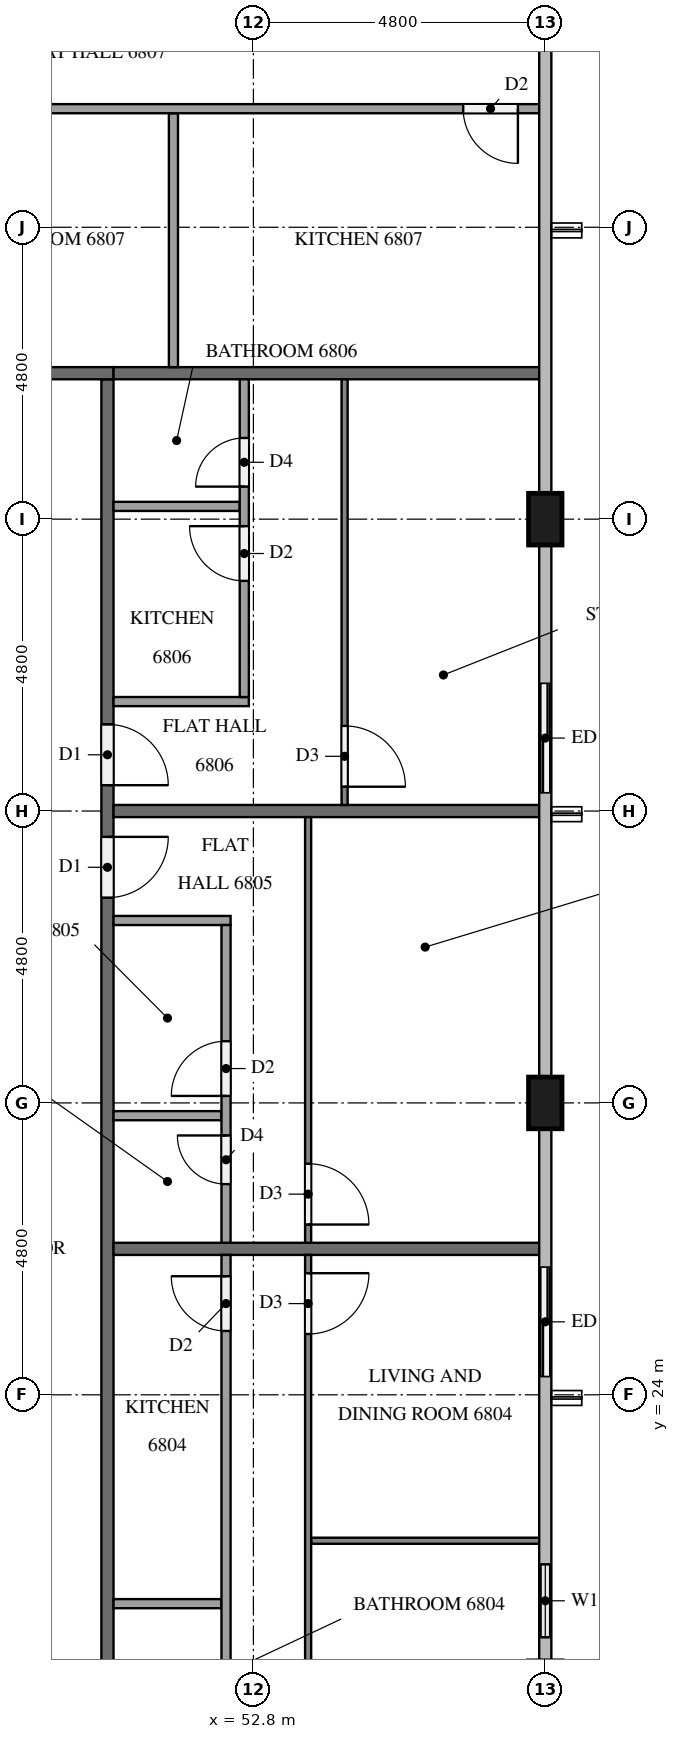
"""IFC4 building model, lengths in metres.
Left out: names, types, materials, properties, quantities, classifications, styles, units other than length and angle.
Written with IfcOpenShell. Run it as: python <this file> out.ifc"""

import sys

from ifc_helpers import new_model, si_unit, direction, frame, frame_2d, origin, origin_2d, place, context, subcontext, project, spatial, rectangle, extrude, element, fill, save


model = new_model("IFC4")
c1 = context("Model", 3, precision=1e-05, world=origin(), true_north=direction((0.0, 1.0)))
c2 = subcontext(c1, "Body", "Model", "MODEL_VIEW")
j1 = project(units=[si_unit("LENGTHUNIT", "METRE"), si_unit("PLANEANGLEUNIT", "RADIAN")], contexts=[c1])
p1 = place(None, origin())
s1 = spatial("IfcSite", under=j1, at=p1, CompositionType="ELEMENT")
p2 = place(p1, origin())
s2 = spatial("IfcBuilding", under=s1, at=p2, CompositionType="ELEMENT")
p3 = place(p2, frame((0.0, 0.0, 259.7)))
s3 = spatial("IfcBuildingStorey", under=s2, at=p3, CompositionType="ELEMENT", Elevation=259.7)
for number, where, z_axis, x_axis in (
    (1, (57.6, 28.8, 0.0), (0.0, 0.0, 1.0), (0.0, 1.0, 0.0)),
    (2, (57.6, 38.4, 0.0), (0.0, 0.0, 1.0), (0.0, 1.0, 0.0)),
):
    element("IfcColumn", number, at=place(p3, frame(where, z_axis=z_axis, x_axis=x_axis)), inside=s3, PredefinedType="COLUMN", context=c2, shape_type="SweptSolid", body=[
        extrude(rectangle(XDim=0.85, YDim=0.55, at=origin_2d()), origin(), (0.0, 0.0, 1.0), 3.1),
    ])
p4 = place(p3, frame((57.6, 19.625, 0.0), z_axis=(0.0, 0.0, 1.0), x_axis=(0.0, 1.0, 0.0)))
e3 = element("IfcWall", 3, at=p4, inside=s3, PredefinedType="SOLIDWALL", context=c2, shape_type="SweptSolid", body=[
    extrude(rectangle(XDim=1.975, YDim=0.15, at=frame_2d((0.988, 0.0))), origin(), (0.0, 0.0, 1.0), 3.1),
])
p5 = place(p4, frame((0.387, 0.0, 0.9)))
e4 = element("IfcOpeningElement", 4, at=p5, cuts=e3, PredefinedType="OPENING", context=c2, shape_type="SweptSolid", body=[
    extrude(rectangle(XDim=1.2, YDim=1.4, at=frame_2d((0.6, 0.7))), frame((0.0, 0.085, 0.0), z_axis=(0.0, -1.0, 0.0), x_axis=(1.0, 0.0, 0.0)), (0.0, 0.0, 1.0), 0.17),
])
p6 = place(p3, frame((57.6, 24.0, 0.0), z_axis=(0.0, 0.0, 1.0), x_axis=(0.0, 1.0, 0.0)))
e5 = element("IfcWall", 5, at=p6, inside=s3, PredefinedType="SOLIDWALL", context=c2, shape_type="SweptSolid", body=[
    extrude(rectangle(XDim=2.4, YDim=0.15, at=frame_2d((1.2, 0.0))), origin(), (0.0, 0.0, 1.0), 3.1),
])
p7 = place(p6, frame((0.3, 0.0, 0.0)))
e6 = element("IfcOpeningElement", 6, at=p7, cuts=e5, PredefinedType="OPENING", context=c2, shape_type="SweptSolid", body=[
    extrude(rectangle(XDim=1.8, YDim=2.4, at=frame_2d((0.9, 1.2))), frame((0.0, 0.085, 0.0), z_axis=(0.0, -1.0, 0.0), x_axis=(1.0, 0.0, 0.0)), (0.0, 0.0, 1.0), 0.17),
])
p8 = place(p3, frame((57.6, 33.6, 0.0), z_axis=(0.0, 0.0, 1.0), x_axis=(0.0, 1.0, 0.0)))
e7 = element("IfcWall", 7, at=p8, inside=s3, PredefinedType="SOLIDWALL", context=c2, shape_type="SweptSolid", body=[
    extrude(rectangle(XDim=2.4, YDim=0.15, at=frame_2d((1.2, 0.0))), origin(), (0.0, 0.0, 1.0), 3.1),
])
p9 = place(p8, frame((0.3, 0.0, 0.0)))
e8 = element("IfcOpeningElement", 8, at=p9, cuts=e7, PredefinedType="OPENING", context=c2, shape_type="SweptSolid", body=[
    extrude(rectangle(XDim=1.8, YDim=2.4, at=frame_2d((0.9, 1.2))), frame((0.0, 0.085, 0.0), z_axis=(0.0, -1.0, 0.0), x_axis=(1.0, 0.0, 0.0)), (0.0, 0.0, 1.0), 0.17),
])
p10 = place(p3, frame((50.4, 40.7, 0.0), z_axis=(0.0, 0.0, 1.0), x_axis=(0.0, -1.0, 0.0)))
e9 = element("IfcWall", 9, at=p10, inside=s3, PredefinedType="PARTITIONING", context=c2, shape_type="SweptSolid", body=[
    extrude(rectangle(XDim=28.6, YDim=0.2, at=frame_2d((14.3, 0.0))), origin(), (0.0, 0.0, 1.0), 3.1),
])
p11 = place(p10, frame((27.275, 0.0, 0.0)))
e10 = element("IfcOpeningElement", 10, at=p11, cuts=e9, PredefinedType="OPENING", context=c2, shape_type="SweptSolid", body=[
    extrude(rectangle(XDim=1.0, YDim=2.1, at=frame_2d((0.5, 1.05))), frame((0.0, 0.11, 0.0), z_axis=(0.0, -1.0, 0.0), x_axis=(1.0, 0.0, 0.0)), (0.0, 0.0, 1.0), 0.22),
])
p12 = place(p10, frame((7.525, 0.0, 0.0)))
e11 = element("IfcOpeningElement", 11, at=p12, cuts=e9, PredefinedType="OPENING", context=c2, shape_type="SweptSolid", body=[
    extrude(rectangle(XDim=1.0, YDim=2.1, at=frame_2d((0.5, 1.05))), frame((0.0, 0.11, 0.0), z_axis=(0.0, -1.0, 0.0), x_axis=(1.0, 0.0, 0.0)), (0.0, 0.0, 1.0), 0.22),
])
p13 = place(p10, frame((5.675, 0.0, 0.0)))
e12 = element("IfcOpeningElement", 12, at=p13, cuts=e9, PredefinedType="OPENING", context=c2, shape_type="SweptSolid", body=[
    extrude(rectangle(XDim=1.0, YDim=2.1, at=frame_2d((0.5, 1.05))), frame((0.0, 0.11, 0.0), z_axis=(0.0, -1.0, 0.0), x_axis=(1.0, 0.0, 0.0)), (0.0, 0.0, 1.0), 0.22),
])
p14 = place(p3, frame((11.9, 40.8, 0.0), z_axis=(0.0, 0.0, 1.0), x_axis=(1.0, 0.0, 0.0)))
e13 = element("IfcWall", 13, at=p14, inside=s3, PredefinedType="PARTITIONING", context=c2, shape_type="SweptSolid", body=[
    extrude(rectangle(XDim=38.6, YDim=0.2, at=frame_2d((19.3, 0.0))), origin(), (0.0, 0.0, 1.0), 3.1),
])
p15 = place(p14, frame((34.125, 0.0, 0.0)))
e14 = element("IfcOpeningElement", 14, at=p15, cuts=e13, PredefinedType="OPENING", context=c2, shape_type="SweptSolid", body=[
    extrude(rectangle(XDim=1.0, YDim=2.1, at=frame_2d((0.5, 1.05))), frame((0.0, 0.11, 0.0), z_axis=(0.0, -1.0, 0.0), x_axis=(1.0, 0.0, 0.0)), (0.0, 0.0, 1.0), 0.22),
])
p16 = place(p14, frame((24.525, 0.0, 0.0)))
e15 = element("IfcOpeningElement", 15, at=p16, cuts=e13, PredefinedType="OPENING", context=c2, shape_type="SweptSolid", body=[
    extrude(rectangle(XDim=1.0, YDim=2.1, at=frame_2d((0.5, 1.05))), frame((0.0, 0.11, 0.0), z_axis=(0.0, -1.0, 0.0), x_axis=(1.0, 0.0, 0.0)), (0.0, 0.0, 1.0), 0.22),
])
p17 = place(p14, frame((10.125, 0.0, 0.0)))
e16 = element("IfcOpeningElement", 16, at=p17, cuts=e13, PredefinedType="OPENING", context=c2, shape_type="SweptSolid", body=[
    extrude(rectangle(XDim=1.0, YDim=2.1, at=frame_2d((0.5, 1.05))), frame((0.0, 0.11, 0.0), z_axis=(0.0, -1.0, 0.0), x_axis=(1.0, 0.0, 0.0)), (0.0, 0.0, 1.0), 0.22),
])
p18 = place(p14, frame((8.275, 0.0, 0.0)))
e17 = element("IfcOpeningElement", 17, at=p18, cuts=e13, PredefinedType="OPENING", context=c2, shape_type="SweptSolid", body=[
    extrude(rectangle(XDim=1.0, YDim=2.1, at=frame_2d((0.5, 1.05))), frame((0.0, 0.11, 0.0), z_axis=(0.0, -1.0, 0.0), x_axis=(1.0, 0.0, 0.0)), (0.0, 0.0, 1.0), 0.22),
])
for number, where, z_axis, x_axis in (
    (18, (50.5, 26.4, 0.0), (0.0, 0.0, 1.0), (1.0, 0.0, 0.0)),
    (19, (50.5, 33.6, 0.0), (0.0, 0.0, 1.0), (1.0, 0.0, 0.0)),
    (20, (50.5, 40.8, 0.0), (0.0, 0.0, 1.0), (1.0, 0.0, 0.0)),
):
    element("IfcWall", number, at=place(p3, frame(where, z_axis=z_axis, x_axis=x_axis)), inside=s3, PredefinedType="PARTITIONING", context=c2, shape_type="SweptSolid", body=[
        extrude(rectangle(XDim=7.0, YDim=0.2, at=frame_2d((3.5, 0.0))), origin(), (0.0, 0.0, 1.0), 3.1),
    ])
p19 = place(p3, frame((53.75, 21.6, 0.0), z_axis=(0.0, 0.0, 1.0), x_axis=(1.0, 0.0, 0.0)))
e21 = element("IfcWall", 21, at=p19, inside=s3, PredefinedType="PARTITIONING", context=c2, shape_type="SweptSolid", body=[
    extrude(rectangle(XDim=3.75, YDim=0.1, at=frame_2d((1.875, 0.0))), origin(), (0.0, 0.0, 1.0), 3.1),
])
p20 = place(p3, frame((53.7, 26.3, 0.0), z_axis=(0.0, 0.0, 1.0), x_axis=(0.0, -1.0, 0.0)))
e22 = element("IfcWall", 22, at=p20, inside=s3, PredefinedType="PARTITIONING", context=c2, shape_type="SweptSolid", body=[
    extrude(rectangle(XDim=14.2, YDim=0.1, at=frame_2d((7.1, 0.0))), origin(), (0.0, 0.0, 1.0), 3.1),
])
p21 = place(p20, frame((9.85, 0.0, 0.0)))
e23 = element("IfcOpeningElement", 23, at=p21, cuts=e22, PredefinedType="OPENING", context=c2, shape_type="SweptSolid", body=[
    extrude(rectangle(XDim=0.9, YDim=2.1, at=frame_2d((0.45, 1.05))), frame((0.0, 0.06, 0.0), z_axis=(0.0, -1.0, 0.0), x_axis=(1.0, 0.0, 0.0)), (0.0, 0.0, 1.0), 0.12),
])
p22 = place(p20, frame((8.25, 0.0, 0.0)))
e24 = element("IfcOpeningElement", 24, at=p22, cuts=e22, PredefinedType="OPENING", context=c2, shape_type="SweptSolid", body=[
    extrude(rectangle(XDim=0.9, YDim=2.1, at=frame_2d((0.45, 1.05))), frame((0.0, 0.06, 0.0), z_axis=(0.0, -1.0, 0.0), x_axis=(1.0, 0.0, 0.0)), (0.0, 0.0, 1.0), 0.12),
])
p23 = place(p20, frame((0.3, 0.0, 0.0)))
e25 = element("IfcOpeningElement", 25, at=p23, cuts=e22, PredefinedType="OPENING", context=c2, shape_type="SweptSolid", body=[
    extrude(rectangle(XDim=1.0, YDim=2.1, at=frame_2d((0.5, 1.05))), frame((0.0, 0.06, 0.0), z_axis=(0.0, -1.0, 0.0), x_axis=(1.0, 0.0, 0.0)), (0.0, 0.0, 1.0), 0.12),
])
p24 = place(p3, frame((50.5, 20.565, 0.0), z_axis=(0.0, 0.0, 1.0), x_axis=(1.0, 0.0, 0.0)))
e26 = element("IfcWall", 26, at=p24, inside=s3, PredefinedType="PARTITIONING", context=c2, shape_type="SweptSolid", body=[
    extrude(rectangle(XDim=1.775, YDim=0.15, at=frame_2d((0.887, 0.0))), origin(), (0.0, 0.0, 1.0), 3.1),
])
p25 = place(p3, frame((52.35, 13.875, 0.0), z_axis=(0.0, 0.0, 1.0), x_axis=(0.0, 1.0, 0.0)))
e27 = element("IfcWall", 27, at=p25, inside=s3, PredefinedType="PARTITIONING", context=c2, shape_type="SweptSolid", body=[
    extrude(rectangle(XDim=12.425, YDim=0.15, at=frame_2d((6.212, 0.0))), origin(), (0.0, 0.0, 1.0), 3.1),
])
p26 = place(p25, frame((1.742, 0.0, 0.0)))
e28 = element("IfcOpeningElement", 28, at=p26, cuts=e27, PredefinedType="OPENING", context=c2, shape_type="SweptSolid", body=[
    extrude(rectangle(XDim=0.8, YDim=2.1, at=frame_2d((0.4, 1.05))), frame((0.0, 0.085, 0.0), z_axis=(0.0, -1.0, 0.0), x_axis=(1.0, 0.0, 0.0)), (0.0, 0.0, 1.0), 0.17),
])
p27 = place(p25, frame((3.192, 0.0, 0.0)))
e29 = element("IfcOpeningElement", 29, at=p27, cuts=e27, PredefinedType="OPENING", context=c2, shape_type="SweptSolid", body=[
    extrude(rectangle(XDim=0.9, YDim=2.1, at=frame_2d((0.45, 1.05))), frame((0.0, 0.085, 0.0), z_axis=(0.0, -1.0, 0.0), x_axis=(1.0, 0.0, 0.0)), (0.0, 0.0, 1.0), 0.17),
])
p28 = place(p25, frame((11.175, 0.0, 0.0)))
e30 = element("IfcOpeningElement", 30, at=p28, cuts=e27, PredefinedType="OPENING", context=c2, shape_type="SweptSolid", body=[
    extrude(rectangle(XDim=0.9, YDim=2.1, at=frame_2d((0.45, 1.05))), frame((0.0, 0.085, 0.0), z_axis=(0.0, -1.0, 0.0), x_axis=(1.0, 0.0, 0.0)), (0.0, 0.0, 1.0), 0.17),
])
p29 = place(p3, frame((53.7, 33.5, 0.0), z_axis=(0.0, 0.0, 1.0), x_axis=(0.0, -1.0, 0.0)))
e31 = element("IfcWall", 31, at=p29, inside=s3, PredefinedType="PARTITIONING", context=c2, shape_type="SweptSolid", body=[
    extrude(rectangle(XDim=7.0, YDim=0.1, at=frame_2d((3.5, 0.0))), origin(), (0.0, 0.0, 1.0), 3.1),
])
p30 = place(p29, frame((5.7, 0.0, 0.0)))
e32 = element("IfcOpeningElement", 32, at=p30, cuts=e31, PredefinedType="OPENING", context=c2, shape_type="SweptSolid", body=[
    extrude(rectangle(XDim=1.0, YDim=2.1, at=frame_2d((0.5, 1.05))), frame((0.0, 0.06, 0.0), z_axis=(0.0, -1.0, 0.0), x_axis=(1.0, 0.0, 0.0)), (0.0, 0.0, 1.0), 0.12),
])
p31 = place(p3, frame((50.5, 28.59, 0.0), z_axis=(0.0, 0.0, 1.0), x_axis=(1.0, 0.0, 0.0)))
e33 = element("IfcWall", 33, at=p31, inside=s3, PredefinedType="PARTITIONING", context=c2, shape_type="SweptSolid", body=[
    extrude(rectangle(XDim=1.775, YDim=0.15, at=frame_2d((0.887, 0.0))), origin(), (0.0, 0.0, 1.0), 3.1),
])
p32 = place(p3, frame((50.5, 31.8, 0.0), z_axis=(0.0, 0.0, 1.0), x_axis=(1.0, 0.0, 0.0)))
e34 = element("IfcWall", 34, at=p32, inside=s3, PredefinedType="PARTITIONING", context=c2, shape_type="SweptSolid", body=[
    extrude(rectangle(XDim=1.925, YDim=0.15, at=frame_2d((0.962, 0.0))), origin(), (0.0, 0.0, 1.0), 3.1),
])
p33 = place(p3, frame((52.35, 26.5, 0.0), z_axis=(0.0, 0.0, 1.0), x_axis=(0.0, 1.0, 0.0)))
e35 = element("IfcWall", 35, at=p33, inside=s3, PredefinedType="PARTITIONING", context=c2, shape_type="SweptSolid", body=[
    extrude(rectangle(XDim=5.225, YDim=0.15, at=frame_2d((2.613, 0.0))), origin(), (0.0, 0.0, 1.0), 3.1),
])
p34 = place(p33, frame((2.415, 0.0, 0.0)))
e36 = element("IfcOpeningElement", 36, at=p34, cuts=e35, PredefinedType="OPENING", context=c2, shape_type="SweptSolid", body=[
    extrude(rectangle(XDim=0.9, YDim=2.1, at=frame_2d((0.45, 1.05))), frame((0.0, 0.085, 0.0), z_axis=(0.0, -1.0, 0.0), x_axis=(1.0, 0.0, 0.0)), (0.0, 0.0, 1.0), 0.17),
])
p35 = place(p33, frame((0.965, 0.0, 0.0)))
e37 = element("IfcOpeningElement", 37, at=p35, cuts=e35, PredefinedType="OPENING", context=c2, shape_type="SweptSolid", body=[
    extrude(rectangle(XDim=0.8, YDim=2.1, at=frame_2d((0.4, 1.05))), frame((0.0, 0.085, 0.0), z_axis=(0.0, -1.0, 0.0), x_axis=(1.0, 0.0, 0.0)), (0.0, 0.0, 1.0), 0.17),
])
p36 = place(p3, frame((54.3, 40.7, 0.0), z_axis=(0.0, 0.0, 1.0), x_axis=(0.0, -1.0, 0.0)))
e38 = element("IfcWall", 38, at=p36, inside=s3, PredefinedType="PARTITIONING", context=c2, shape_type="SweptSolid", body=[
    extrude(rectangle(XDim=7.0, YDim=0.1, at=frame_2d((3.5, 0.0))), origin(), (0.0, 0.0, 1.0), 3.1),
])
p37 = place(p36, frame((5.7, 0.0, 0.0)))
e39 = element("IfcOpeningElement", 39, at=p37, cuts=e38, PredefinedType="OPENING", context=c2, shape_type="SweptSolid", body=[
    extrude(rectangle(XDim=1.0, YDim=2.1, at=frame_2d((0.5, 1.05))), frame((0.0, 0.06, 0.0), z_axis=(0.0, -1.0, 0.0), x_axis=(1.0, 0.0, 0.0)), (0.0, 0.0, 1.0), 0.12),
])
p38 = place(p3, frame((50.5, 38.61, 0.0), z_axis=(0.0, 0.0, 1.0), x_axis=(1.0, 0.0, 0.0)))
e40 = element("IfcWall", 40, at=p38, inside=s3, PredefinedType="PARTITIONING", context=c2, shape_type="SweptSolid", body=[
    extrude(rectangle(XDim=2.075, YDim=0.15, at=frame_2d((1.038, 0.0))), origin(), (0.0, 0.0, 1.0), 3.1),
])
p39 = place(p3, frame((50.5, 35.4, 0.0), z_axis=(0.0, 0.0, 1.0), x_axis=(1.0, 0.0, 0.0)))
e41 = element("IfcWall", 41, at=p39, inside=s3, PredefinedType="PARTITIONING", context=c2, shape_type="SweptSolid", body=[
    extrude(rectangle(XDim=2.225, YDim=0.15, at=frame_2d((1.113, 0.0))), origin(), (0.0, 0.0, 1.0), 3.1),
])
p40 = place(p3, frame((52.65, 35.475, 0.0), z_axis=(0.0, 0.0, 1.0), x_axis=(0.0, 1.0, 0.0)))
e42 = element("IfcWall", 42, at=p40, inside=s3, PredefinedType="PARTITIONING", context=c2, shape_type="SweptSolid", body=[
    extrude(rectangle(XDim=5.225, YDim=0.15, at=frame_2d((2.612, 0.0))), origin(), (0.0, 0.0, 1.0), 3.1),
])
p41 = place(p40, frame((1.91, 0.0, 0.0)))
e43 = element("IfcOpeningElement", 43, at=p41, cuts=e42, PredefinedType="OPENING", context=c2, shape_type="SweptSolid", body=[
    extrude(rectangle(XDim=0.9, YDim=2.1, at=frame_2d((0.45, 1.05))), frame((0.0, 0.085, 0.0), z_axis=(0.0, -1.0, 0.0), x_axis=(1.0, 0.0, 0.0)), (0.0, 0.0, 1.0), 0.17),
])
p42 = place(p40, frame((3.46, 0.0, 0.0)))
e44 = element("IfcOpeningElement", 44, at=p42, cuts=e42, PredefinedType="OPENING", context=c2, shape_type="SweptSolid", body=[
    extrude(rectangle(XDim=0.8, YDim=2.1, at=frame_2d((0.4, 1.05))), frame((0.0, 0.085, 0.0), z_axis=(0.0, -1.0, 0.0), x_axis=(1.0, 0.0, 0.0)), (0.0, 0.0, 1.0), 0.17),
])
p43 = place(p3, frame((51.485, 40.9, 0.0), z_axis=(0.0, 0.0, 1.0), x_axis=(0.0, 1.0, 0.0)))
e45 = element("IfcWall", 45, at=p43, inside=s3, PredefinedType="PARTITIONING", context=c2, shape_type="SweptSolid", body=[
    extrude(rectangle(XDim=4.175, YDim=0.15, at=frame_2d((2.087, 0.0))), origin(), (0.0, 0.0, 1.0), 3.1),
])
p44 = place(p3, frame((57.5, 45.15, 0.0), z_axis=(0.0, 0.0, 1.0), x_axis=(-1.0, 0.0, 0.0)))
e46 = element("IfcWall", 46, at=p44, inside=s3, PredefinedType="PARTITIONING", context=c2, shape_type="SweptSolid", body=[
    extrude(rectangle(XDim=10.025, YDim=0.15, at=frame_2d((5.012, 0.0))), origin(), (0.0, 0.0, 1.0), 3.1),
])
p45 = place(p44, frame((8.925, 0.0, 0.0)))
e47 = element("IfcOpeningElement", 47, at=p45, cuts=e46, PredefinedType="OPENING", context=c2, shape_type="SweptSolid", body=[
    extrude(rectangle(XDim=0.8, YDim=2.1, at=frame_2d((0.4, 1.05))), frame((0.0, 0.085, 0.0), z_axis=(0.0, -1.0, 0.0), x_axis=(1.0, 0.0, 0.0)), (0.0, 0.0, 1.0), 0.17),
])
p46 = place(p44, frame((0.35, 0.0, 0.0)))
e48 = element("IfcOpeningElement", 48, at=p46, cuts=e46, PredefinedType="OPENING", context=c2, shape_type="SweptSolid", body=[
    extrude(rectangle(XDim=0.9, YDim=2.1, at=frame_2d((0.45, 1.05))), frame((0.0, 0.085, 0.0), z_axis=(0.0, -1.0, 0.0), x_axis=(1.0, 0.0, 0.0)), (0.0, 0.0, 1.0), 0.17),
])
p47 = place(p5, origin())
e49 = element("IfcWindow", 49, at=p47, inside=s3, PartitioningType="SINGLE_PANEL", PredefinedType="WINDOW", context=c2, shape_type="SweptSolid", body=[
    extrude(rectangle(XDim=1.2, YDim=1.4, at=frame_2d((0.6, 0.7))), frame((0.0, 0.03, 0.0), z_axis=(0.0, -1.0, 0.0), x_axis=(1.0, 0.0, 0.0)), (0.0, 0.0, 1.0), 0.06),
])
fill(e4, e49)
p48 = place(p7, origin())
e50 = element("IfcDoor", 50, at=p48, inside=s3, OperationType="SLIDING_TO_LEFT", PredefinedType="DOOR", context=c2, shape_type="SweptSolid", body=[
    extrude(rectangle(XDim=1.8, YDim=2.4, at=frame_2d((0.9, 1.2))), frame((0.0, 0.025, 0.0), z_axis=(0.0, -1.0, 0.0), x_axis=(1.0, 0.0, 0.0)), (0.0, 0.0, 1.0), 0.05),
])
fill(e6, e50)
p49 = place(p9, origin())
e51 = element("IfcDoor", 51, at=p49, inside=s3, OperationType="SLIDING_TO_RIGHT", PredefinedType="DOOR", context=c2, shape_type="SweptSolid", body=[
    extrude(rectangle(XDim=1.8, YDim=2.4, at=frame_2d((0.9, 1.2))), frame((0.0, 0.025, 0.0), z_axis=(0.0, -1.0, 0.0), x_axis=(1.0, 0.0, 0.0)), (0.0, 0.0, 1.0), 0.05),
])
fill(e8, e51)
p50 = place(p12, origin())
e52 = element("IfcDoor", 52, at=p50, inside=s3, OperationType="SINGLE_SWING_LEFT", PredefinedType="DOOR", context=c2, shape_type="SweptSolid", body=[
    extrude(rectangle(XDim=1.0, YDim=2.1, at=frame_2d((0.5, 1.05))), frame((0.0, 0.025, 0.0), z_axis=(0.0, -1.0, 0.0), x_axis=(1.0, 0.0, 0.0)), (0.0, 0.0, 1.0), 0.05),
])
fill(e11, e52)
p51 = place(p13, origin())
e53 = element("IfcDoor", 53, at=p51, inside=s3, OperationType="SINGLE_SWING_RIGHT", PredefinedType="DOOR", context=c2, shape_type="SweptSolid", body=[
    extrude(rectangle(XDim=1.0, YDim=2.1, at=frame_2d((0.5, 1.05))), frame((0.0, 0.025, 0.0), z_axis=(0.0, -1.0, 0.0), x_axis=(1.0, 0.0, 0.0)), (0.0, 0.0, 1.0), 0.05),
])
fill(e12, e53)
p52 = place(p23, origin())
e54 = element("IfcDoor", 54, at=p52, inside=s3, OperationType="SINGLE_SWING_LEFT", PredefinedType="DOOR", context=c2, shape_type="SweptSolid", body=[
    extrude(rectangle(XDim=1.0, YDim=2.1, at=frame_2d((0.5, 1.05))), frame((0.0, 0.025, 0.0), z_axis=(0.0, -1.0, 0.0), x_axis=(1.0, 0.0, 0.0)), (0.0, 0.0, 1.0), 0.05),
])
fill(e25, e54)
p53 = place(p28, origin())
e55 = element("IfcDoor", 55, at=p53, inside=s3, OperationType="SINGLE_SWING_RIGHT", PredefinedType="DOOR", context=c2, shape_type="SweptSolid", body=[
    extrude(rectangle(XDim=0.9, YDim=2.1, at=frame_2d((0.45, 1.05))), frame((0.0, 0.025, 0.0), z_axis=(0.0, -1.0, 0.0), x_axis=(1.0, 0.0, 0.0)), (0.0, 0.0, 1.0), 0.05),
])
fill(e30, e55)
p54 = place(p30, origin())
e56 = element("IfcDoor", 56, at=p54, inside=s3, OperationType="SINGLE_SWING_RIGHT", PredefinedType="DOOR", context=c2, shape_type="SweptSolid", body=[
    extrude(rectangle(XDim=1.0, YDim=2.1, at=frame_2d((0.5, 1.05))), frame((0.0, 0.025, 0.0), z_axis=(0.0, -1.0, 0.0), x_axis=(1.0, 0.0, 0.0)), (0.0, 0.0, 1.0), 0.05),
])
fill(e32, e56)
p55 = place(p34, origin())
e57 = element("IfcDoor", 57, at=p55, inside=s3, OperationType="SINGLE_SWING_LEFT", PredefinedType="DOOR", context=c2, shape_type="SweptSolid", body=[
    extrude(rectangle(XDim=0.9, YDim=2.1, at=frame_2d((0.45, 1.05))), frame((0.0, 0.025, 0.0), z_axis=(0.0, -1.0, 0.0), x_axis=(1.0, 0.0, 0.0)), (0.0, 0.0, 1.0), 0.05),
])
fill(e36, e57)
p56 = place(p35, origin())
e58 = element("IfcDoor", 58, at=p56, inside=s3, OperationType="SINGLE_SWING_RIGHT", PredefinedType="DOOR", context=c2, shape_type="SweptSolid", body=[
    extrude(rectangle(XDim=0.8, YDim=2.1, at=frame_2d((0.4, 1.05))), frame((0.0, 0.025, 0.0), z_axis=(0.0, -1.0, 0.0), x_axis=(1.0, 0.0, 0.0)), (0.0, 0.0, 1.0), 0.05),
])
fill(e37, e58)
p57 = place(p37, origin())
e59 = element("IfcDoor", 59, at=p57, inside=s3, OperationType="SINGLE_SWING_RIGHT", PredefinedType="DOOR", context=c2, shape_type="SweptSolid", body=[
    extrude(rectangle(XDim=1.0, YDim=2.1, at=frame_2d((0.5, 1.05))), frame((0.0, 0.025, 0.0), z_axis=(0.0, -1.0, 0.0), x_axis=(1.0, 0.0, 0.0)), (0.0, 0.0, 1.0), 0.05),
])
fill(e39, e59)
p58 = place(p41, origin())
e60 = element("IfcDoor", 60, at=p58, inside=s3, OperationType="SINGLE_SWING_RIGHT", PredefinedType="DOOR", context=c2, shape_type="SweptSolid", body=[
    extrude(rectangle(XDim=0.9, YDim=2.1, at=frame_2d((0.45, 1.05))), frame((0.0, 0.025, 0.0), z_axis=(0.0, -1.0, 0.0), x_axis=(1.0, 0.0, 0.0)), (0.0, 0.0, 1.0), 0.05),
])
fill(e43, e60)
p59 = place(p42, origin())
e61 = element("IfcDoor", 61, at=p59, inside=s3, OperationType="SINGLE_SWING_LEFT", PredefinedType="DOOR", context=c2, shape_type="SweptSolid", body=[
    extrude(rectangle(XDim=0.8, YDim=2.1, at=frame_2d((0.4, 1.05))), frame((0.0, 0.025, 0.0), z_axis=(0.0, -1.0, 0.0), x_axis=(1.0, 0.0, 0.0)), (0.0, 0.0, 1.0), 0.05),
])
fill(e44, e61)
p60 = place(p46, origin())
e62 = element("IfcDoor", 62, at=p60, inside=s3, OperationType="SINGLE_SWING_LEFT", PredefinedType="DOOR", context=c2, shape_type="SweptSolid", body=[
    extrude(rectangle(XDim=0.9, YDim=2.1, at=frame_2d((0.45, 1.05))), frame((0.0, 0.025, 0.0), z_axis=(0.0, -1.0, 0.0), x_axis=(1.0, 0.0, 0.0)), (0.0, 0.0, 1.0), 0.05),
])
fill(e48, e62)
save(model, sys.argv[1])
